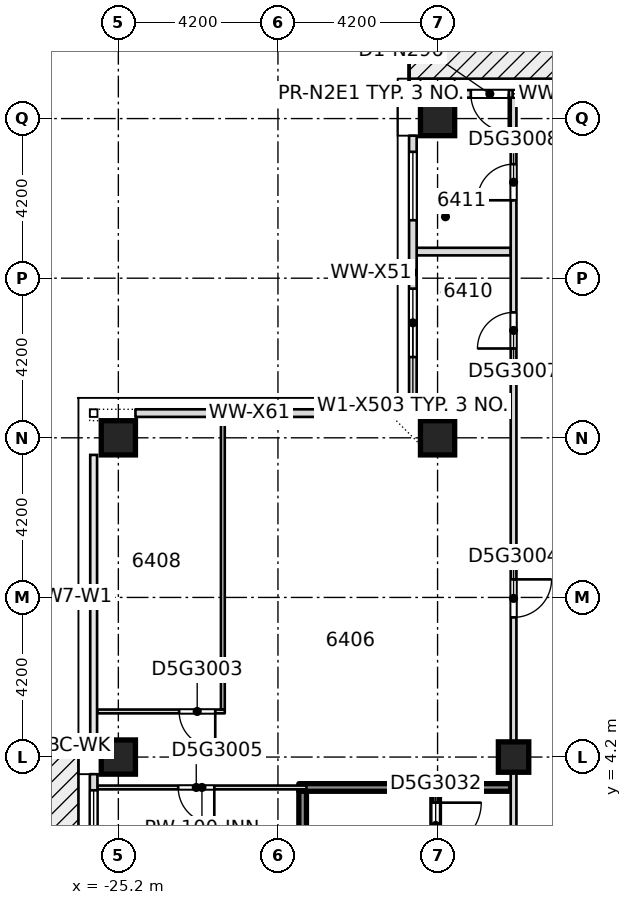
"""IFC4 building model, lengths in metres.
Left out: names, types, materials, properties, quantities, classifications, styles, units other than length and angle.
Written with IfcOpenShell. Run it as: python <this file> out.ifc"""

import sys

from ifc_helpers import new_model, si_unit, direction, frame, frame_2d, origin, origin_2d, place, context, subcontext, project, spatial, rectangle, extrude, element, fill, save


model = new_model("IFC4")
c1 = context("Model", 3, precision=1e-05, world=origin(), true_north=direction((0.0, 1.0)))
c2 = subcontext(c1, "Body", "Model", "MODEL_VIEW")
j1 = project(units=[si_unit("LENGTHUNIT", "METRE"), si_unit("PLANEANGLEUNIT", "RADIAN")], contexts=[c1])
p1 = place(None, origin())
s1 = spatial("IfcSite", under=j1, at=p1, CompositionType="ELEMENT")
p2 = place(p1, origin())
s2 = spatial("IfcBuilding", under=s1, at=p2, CompositionType="ELEMENT")
p3 = place(p2, frame((0.0, 0.0, 244.15)))
s3 = spatial("IfcBuildingStorey", under=s2, at=p3, CompositionType="ELEMENT", Elevation=244.15)
for number, where, z_axis, x_axis in (
    (1, (-25.2, 4.2, -0.4), (0.0, 0.0, 1.0), (1.0, 0.0, 0.0)),
    (2, (-25.2, 12.6, -0.4), (0.0, 0.0, 1.0), (1.0, 0.0, 0.0)),
    (3, (-16.8, 12.6, -0.4), (0.0, 0.0, 1.0), (1.0, 0.0, 0.0)),
    (4, (-16.8, 21.0, -0.4), (0.0, 0.0, 1.0), (1.0, 0.0, 0.0)),
):
    element("IfcColumn", number, at=place(p3, frame(where, z_axis=z_axis, x_axis=x_axis)), inside=s3, PredefinedType="COLUMN", context=c2, shape_type="SweptSolid", body=[
        extrude(rectangle(XDim=0.9, YDim=0.9, at=origin_2d()), origin(), (0.0, 0.0, 1.0), 3.45),
    ])
p4 = place(p3, frame((-14.8, 4.2, -0.4), z_axis=(0.0, 0.0, 1.0), x_axis=(1.0, 0.0, 0.0)))
e5 = element("IfcColumn", 5, at=p4, inside=s3, PredefinedType="COLUMN", context=c2, shape_type="SweptSolid", body=[
    extrude(rectangle(XDim=0.8, YDim=0.8, at=origin_2d()), origin(), (0.0, 0.0, 1.0), 3.45),
])
p5 = place(p3, frame((-25.75, 3.4, 0.0), z_axis=(0.0, 0.0, 1.0), x_axis=(1.0, 0.0, 0.0)))
e6 = element("IfcWall", 6, at=p5, inside=s3, PredefinedType="PARTITIONING", context=c2, shape_type="SweptSolid", body=[
    extrude(rectangle(XDim=5.5, YDim=0.1, at=frame_2d((2.75, 0.0))), origin(), (0.0, 0.0, 1.0), 3.05),
])
p6 = place(p5, frame((2.125, 0.0, 0.0)))
e7 = element("IfcOpeningElement", 7, at=p6, cuts=e6, PredefinedType="OPENING", context=c2, shape_type="SweptSolid", body=[
    extrude(rectangle(XDim=0.95, YDim=2.1, at=frame_2d((0.475, 1.05))), frame((0.0, 0.06, 0.0), z_axis=(0.0, -1.0, 0.0), x_axis=(1.0, 0.0, 0.0)), (0.0, 0.0, 1.0), 0.12),
])
p7 = place(p3, frame((-20.45, 3.4, 0.0), z_axis=(0.0, 0.0, 1.0), x_axis=(1.0, 0.0, 0.0)))
e8 = element("IfcWall", 8, at=p7, inside=s3, PredefinedType="SOLIDWALL", context=c2, shape_type="SweptSolid", body=[
    extrude(rectangle(XDim=5.575, YDim=0.2, at=frame_2d((2.788, 0.0))), origin(), (0.0, 0.0, 1.0), 3.05),
])
p8 = place(p3, frame((-25.75, 5.4, 0.0), z_axis=(0.0, 0.0, 1.0), x_axis=(1.0, 0.0, 0.0)))
e9 = element("IfcWall", 9, at=p8, inside=s3, PredefinedType="PARTITIONING", context=c2, shape_type="SweptSolid", body=[
    extrude(rectangle(XDim=3.35, YDim=0.1, at=frame_2d((1.675, 0.0))), origin(), (0.0, 0.0, 1.0), 3.05),
])
p9 = place(p8, frame((2.15, 0.0, 0.0)))
e10 = element("IfcOpeningElement", 10, at=p9, cuts=e9, PredefinedType="OPENING", context=c2, shape_type="SweptSolid", body=[
    extrude(rectangle(XDim=0.95, YDim=2.1, at=frame_2d((0.475, 1.05))), frame((0.0, 0.06, 0.0), z_axis=(0.0, -1.0, 0.0), x_axis=(1.0, 0.0, 0.0)), (0.0, 0.0, 1.0), 0.12),
])
for number, where, z_axis, x_axis in (
    (11, (-17.35, 13.35, 0.0), (0.0, 0.0, 1.0), (1.0, 0.0, 0.0)),
    (12, (-17.35, 17.5, 0.0), (0.0, 0.0, 1.0), (1.0, 0.0, 0.0)),
):
    element("IfcWall", number, at=place(p3, frame(where, z_axis=z_axis, x_axis=x_axis)), inside=s3, PredefinedType="PARTITIONING", context=c2, shape_type="SweptSolid", body=[
        extrude(rectangle(XDim=2.475, YDim=0.2, at=frame_2d((1.238, 0.0))), origin(), (0.0, 0.0, 1.0), 3.05),
    ])
p10 = place(p3, frame((-22.45, 5.45, 0.0), z_axis=(0.0, 0.0, 1.0), x_axis=(0.0, 1.0, 0.0)))
e13 = element("IfcWall", 13, at=p10, inside=s3, PredefinedType="PARTITIONING", context=c2, shape_type="SweptSolid", body=[
    extrude(rectangle(XDim=7.7, YDim=0.1, at=frame_2d((3.85, 0.0))), origin(), (0.0, 0.0, 1.0), 3.05),
])
p11 = place(p3, frame((-20.35, -0.53, 0.0), z_axis=(0.0, 0.0, 1.0), x_axis=(0.0, 1.0, 0.0)))
e14 = element("IfcWall", 14, at=p11, inside=s3, PredefinedType="SOLIDWALL", context=c2, shape_type="SweptSolid", body=[
    extrude(rectangle(XDim=3.83, YDim=0.2, at=frame_2d((1.915, 0.0))), origin(), (0.0, 0.0, 1.0), 3.05),
])
p12 = place(p3, frame((-16.85, -3.3, 0.0), z_axis=(0.0, 0.0, 1.0), x_axis=(0.0, 1.0, 0.0)))
e15 = element("IfcWall", 15, at=p12, inside=s3, PredefinedType="SOLIDWALL", context=c2, shape_type="SweptSolid", body=[
    extrude(rectangle(XDim=6.6, YDim=0.2, at=frame_2d((3.3, 0.0))), origin(), (0.0, 0.0, 1.0), 3.05),
])
p13 = place(p12, frame((5.1, 0.0, 0.0)))
e16 = element("IfcOpeningElement", 16, at=p13, cuts=e15, PredefinedType="OPENING", context=c2, shape_type="SweptSolid", body=[
    extrude(rectangle(XDim=1.2, YDim=2.1, at=frame_2d((0.6, 1.05))), frame((0.0, 0.11, 0.0), z_axis=(0.0, -1.0, 0.0), x_axis=(1.0, 0.0, 0.0)), (0.0, 0.0, 1.0), 0.22),
])
p14 = place(p3, frame((-14.8, -9.85, 0.0), z_axis=(0.0, 0.0, 1.0), x_axis=(0.0, 1.0, 0.0)))
e17 = element("IfcWall", 17, at=p14, inside=s3, PredefinedType="PARTITIONING", context=c2, shape_type="SweptSolid", body=[
    extrude(rectangle(XDim=31.4, YDim=0.15, at=frame_2d((15.7, 0.0))), origin(), (0.0, 0.0, 1.0), 3.05),
])
p15 = place(p14, frame((0.3, 0.0, 0.0)))
e18 = element("IfcOpeningElement", 18, at=p15, cuts=e17, PredefinedType="OPENING", context=c2, shape_type="SweptSolid", body=[
    extrude(rectangle(XDim=0.95, YDim=2.1, at=frame_2d((0.475, 1.05))), frame((0.0, 0.085, 0.0), z_axis=(0.0, -1.0, 0.0), x_axis=(1.0, 0.0, 0.0)), (0.0, 0.0, 1.0), 0.17),
])
p16 = place(p14, frame((17.725, 0.0, 0.0)))
e19 = element("IfcOpeningElement", 19, at=p16, cuts=e17, PredefinedType="OPENING", context=c2, shape_type="SweptSolid", body=[
    extrude(rectangle(XDim=1.0, YDim=2.1, at=frame_2d((0.5, 1.05))), frame((0.0, 0.085, 0.0), z_axis=(0.0, -1.0, 0.0), x_axis=(1.0, 0.0, 0.0)), (0.0, 0.0, 1.0), 0.17),
])
p17 = place(p14, frame((24.8, 0.0, 0.0)))
e20 = element("IfcOpeningElement", 20, at=p17, cuts=e17, PredefinedType="OPENING", context=c2, shape_type="SweptSolid", body=[
    extrude(rectangle(XDim=0.95, YDim=2.1, at=frame_2d((0.475, 1.05))), frame((0.0, 0.085, 0.0), z_axis=(0.0, -1.0, 0.0), x_axis=(1.0, 0.0, 0.0)), (0.0, 0.0, 1.0), 0.17),
])
p18 = place(p14, frame((28.7, 0.0, 0.0)))
e21 = element("IfcOpeningElement", 21, at=p18, cuts=e17, PredefinedType="OPENING", context=c2, shape_type="SweptSolid", body=[
    extrude(rectangle(XDim=0.95, YDim=2.1, at=frame_2d((0.475, 1.05))), frame((0.0, 0.085, 0.0), z_axis=(0.0, -1.0, 0.0), x_axis=(1.0, 0.0, 0.0)), (0.0, 0.0, 1.0), 0.17),
])
p19 = place(p14, frame((9.3, 0.0, 0.0)))
e22 = element("IfcOpeningElement", 22, at=p19, cuts=e17, PredefinedType="OPENING", context=c2, shape_type="SweptSolid", body=[
    extrude(rectangle(XDim=1.1, YDim=2.1, at=frame_2d((0.55, 1.05))), frame((0.0, 0.085, 0.0), z_axis=(0.0, -1.0, 0.0), x_axis=(1.0, 0.0, 0.0)), (0.0, 0.0, 1.0), 0.17),
])
p20 = place(p14, frame((4.15, 0.0, 0.0)))
e23 = element("IfcOpeningElement", 23, at=p20, cuts=e17, PredefinedType="OPENING", context=c2, shape_type="SweptSolid", body=[
    extrude(rectangle(XDim=1.0, YDim=2.1, at=frame_2d((0.5, 1.05))), frame((0.0, 0.085, 0.0), z_axis=(0.0, -1.0, 0.0), x_axis=(1.0, 0.0, 0.0)), (0.0, 0.0, 1.0), 0.17),
])
p21 = place(p3, frame((-12.6, 21.65, 0.0), z_axis=(0.0, 0.0, 1.0), x_axis=(-1.0, 0.0, 0.0)))
e24 = element("IfcWall", 24, at=p21, inside=s3, PredefinedType="STANDARD", context=c2, shape_type="SweptSolid", body=[
    extrude(rectangle(XDim=3.75, YDim=0.2, at=frame_2d((1.875, 0.0))), origin(), (0.0, 0.0, 1.0), 3.05),
])
p22 = place(p21, frame((0.425, 0.0, 0.2)))
e25 = element("IfcOpeningElement", 25, at=p22, cuts=e24, PredefinedType="OPENING", context=c2, shape_type="SweptSolid", body=[
    extrude(rectangle(XDim=1.8, YDim=2.65, at=frame_2d((0.9, 1.325))), frame((0.0, 0.11, 0.0), z_axis=(0.0, -1.0, 0.0), x_axis=(1.0, 0.0, 0.0)), (0.0, 0.0, 1.0), 0.22),
])
p23 = place(p21, frame((2.325, 0.0, 0.0)))
e26 = element("IfcOpeningElement", 26, at=p23, cuts=e24, PredefinedType="OPENING", context=c2, shape_type="SweptSolid", body=[
    extrude(rectangle(XDim=1.0, YDim=2.4, at=frame_2d((0.5, 1.2))), frame((0.0, 0.11, 0.0), z_axis=(0.0, -1.0, 0.0), x_axis=(1.0, 0.0, 0.0)), (0.0, 0.0, 1.0), 0.22),
])
p24 = place(p3, frame((-17.45, 20.55, 0.0), z_axis=(0.0, 0.0, 1.0), x_axis=(0.0, -1.0, 0.0)))
e27 = element("IfcWall", 27, at=p24, inside=s3, PredefinedType="STANDARD", context=c2, shape_type="SweptSolid", body=[
    extrude(rectangle(XDim=7.2, YDim=0.2, at=frame_2d((3.6, 0.0))), origin(), (0.0, 0.0, 1.0), 3.05),
])
p25 = place(p24, frame((4.025, 0.0, 0.2)))
e28 = element("IfcOpeningElement", 28, at=p25, cuts=e27, PredefinedType="OPENING", context=c2, shape_type="SweptSolid", body=[
    extrude(rectangle(XDim=1.8, YDim=2.65, at=frame_2d((0.9, 1.325))), frame((0.0, 0.11, 0.0), z_axis=(0.0, -1.0, 0.0), x_axis=(1.0, 0.0, 0.0)), (0.0, 0.0, 1.0), 0.22),
])
p26 = place(p24, frame((0.425, 0.0, 0.2)))
e29 = element("IfcOpeningElement", 29, at=p26, cuts=e27, PredefinedType="OPENING", context=c2, shape_type="SweptSolid", body=[
    extrude(rectangle(XDim=1.8, YDim=2.65, at=frame_2d((0.9, 1.325))), frame((0.0, 0.11, 0.0), z_axis=(0.0, -1.0, 0.0), x_axis=(1.0, 0.0, 0.0)), (0.0, 0.0, 1.0), 0.22),
])
p27 = place(p3, frame((-17.55, 13.25, 0.0), z_axis=(0.0, 0.0, 1.0), x_axis=(-1.0, 0.0, 0.0)))
e30 = element("IfcWall", 30, at=p27, inside=s3, PredefinedType="STANDARD", context=c2, shape_type="SweptSolid", body=[
    extrude(rectangle(XDim=7.2, YDim=0.2, at=frame_2d((3.6, 0.0))), origin(), (0.0, 0.0, 1.0), 3.05),
])
p28 = place(p3, frame((-25.85, 3.75, 0.0), z_axis=(0.0, 0.0, 1.0), x_axis=(0.0, -1.0, 0.0)))
e31 = element("IfcWall", 31, at=p28, inside=s3, PredefinedType="STANDARD", context=c2, shape_type="SweptSolid", body=[
    extrude(rectangle(XDim=7.5, YDim=0.2, at=frame_2d((3.75, 0.0))), origin(), (0.0, 0.0, 1.0), 3.05),
])
p29 = place(p28, frame((4.175, 0.0, 0.2)))
e32 = element("IfcOpeningElement", 32, at=p29, cuts=e31, PredefinedType="OPENING", context=c2, shape_type="SweptSolid", body=[
    extrude(rectangle(XDim=1.8, YDim=2.65, at=frame_2d((0.9, 1.325))), frame((0.0, 0.11, 0.0), z_axis=(0.0, -1.0, 0.0), x_axis=(1.0, 0.0, 0.0)), (0.0, 0.0, 1.0), 0.22),
])
p30 = place(p28, frame((6.025, 0.0, 0.0)))
e33 = element("IfcOpeningElement", 33, at=p30, cuts=e31, PredefinedType="OPENING", context=c2, shape_type="SweptSolid", body=[
    extrude(rectangle(XDim=1.0, YDim=2.4, at=frame_2d((0.5, 1.2))), frame((0.0, 0.11, 0.0), z_axis=(0.0, -1.0, 0.0), x_axis=(1.0, 0.0, 0.0)), (0.0, 0.0, 1.0), 0.22),
])
p31 = place(p28, frame((0.425, 0.0, 0.2)))
e34 = element("IfcOpeningElement", 34, at=p31, cuts=e31, PredefinedType="OPENING", context=c2, shape_type="SweptSolid", body=[
    extrude(rectangle(XDim=1.8, YDim=2.65, at=frame_2d((0.9, 1.325))), frame((0.0, 0.11, 0.0), z_axis=(0.0, -1.0, 0.0), x_axis=(1.0, 0.0, 0.0)), (0.0, 0.0, 1.0), 0.22),
])
p32 = place(p28, frame((2.325, 0.0, 0.0)))
e35 = element("IfcOpeningElement", 35, at=p32, cuts=e31, PredefinedType="OPENING", context=c2, shape_type="SweptSolid", body=[
    extrude(rectangle(XDim=1.0, YDim=2.4, at=frame_2d((0.5, 1.2))), frame((0.0, 0.11, 0.0), z_axis=(0.0, -1.0, 0.0), x_axis=(1.0, 0.0, 0.0)), (0.0, 0.0, 1.0), 0.22),
])
p33 = place(p9, origin())
e36 = element("IfcDoor", 36, at=p33, inside=s3, OperationType="SINGLE_SWING_RIGHT", PredefinedType="DOOR", context=c2, shape_type="SweptSolid", body=[
    extrude(rectangle(XDim=0.95, YDim=2.1, at=frame_2d((0.475, 1.05))), frame((0.0, 0.025, 0.0), z_axis=(0.0, -1.0, 0.0), x_axis=(1.0, 0.0, 0.0)), (0.0, 0.0, 1.0), 0.05),
])
fill(e10, e36)
p34 = place(p16, origin())
e37 = element("IfcDoor", 37, at=p34, inside=s3, OperationType="SINGLE_SWING_RIGHT", PredefinedType="DOOR", context=c2, shape_type="SweptSolid", body=[
    extrude(rectangle(XDim=1.0, YDim=2.1, at=frame_2d((0.5, 1.05))), frame((0.0, 0.025, 0.0), z_axis=(0.0, -1.0, 0.0), x_axis=(1.0, 0.0, 0.0)), (0.0, 0.0, 1.0), 0.05),
])
fill(e19, e37)
p35 = place(p6, origin())
e38 = element("IfcDoor", 38, at=p35, inside=s3, OperationType="SINGLE_SWING_LEFT", PredefinedType="DOOR", context=c2, shape_type="SweptSolid", body=[
    extrude(rectangle(XDim=0.95, YDim=2.1, at=frame_2d((0.475, 1.05))), frame((0.0, 0.025, 0.0), z_axis=(0.0, -1.0, 0.0), x_axis=(1.0, 0.0, 0.0)), (0.0, 0.0, 1.0), 0.05),
])
fill(e7, e38)
p36 = place(p17, origin())
e39 = element("IfcDoor", 39, at=p36, inside=s3, OperationType="SINGLE_SWING_LEFT", PredefinedType="DOOR", context=c2, shape_type="SweptSolid", body=[
    extrude(rectangle(XDim=0.95, YDim=2.1, at=frame_2d((0.475, 1.05))), frame((0.0, 0.025, 0.0), z_axis=(0.0, -1.0, 0.0), x_axis=(1.0, 0.0, 0.0)), (0.0, 0.0, 1.0), 0.05),
])
fill(e20, e39)
p37 = place(p18, origin())
e40 = element("IfcDoor", 40, at=p37, inside=s3, OperationType="SINGLE_SWING_LEFT", PredefinedType="DOOR", context=c2, shape_type="SweptSolid", body=[
    extrude(rectangle(XDim=0.95, YDim=2.1, at=frame_2d((0.475, 1.05))), frame((0.0, 0.025, 0.0), z_axis=(0.0, -1.0, 0.0), x_axis=(1.0, 0.0, 0.0)), (0.0, 0.0, 1.0), 0.05),
])
fill(e21, e40)
p38 = place(p13, origin())
e41 = element("IfcDoor", 41, at=p38, inside=s3, OperationType="SINGLE_SWING_RIGHT", PredefinedType="DOOR", context=c2, shape_type="SweptSolid", body=[
    extrude(rectangle(XDim=1.2, YDim=2.1, at=frame_2d((0.6, 1.05))), frame((0.0, 0.025, 0.0), z_axis=(0.0, -1.0, 0.0), x_axis=(1.0, 0.0, 0.0)), (0.0, 0.0, 1.0), 0.05),
])
fill(e16, e41)
p39 = place(p22, origin())
e42 = element("IfcWindow", 42, at=p39, inside=s3, PartitioningType="SINGLE_PANEL", PredefinedType="WINDOW", context=c2, shape_type="SweptSolid", body=[
    extrude(rectangle(XDim=1.8, YDim=2.65, at=frame_2d((0.9, 1.325))), frame((0.0, 0.03, 0.0), z_axis=(0.0, -1.0, 0.0), x_axis=(1.0, 0.0, 0.0)), (0.0, 0.0, 1.0), 0.06),
])
fill(e25, e42)
p40 = place(p23, origin())
e43 = element("IfcDoor", 43, at=p40, inside=s3, OperationType="SINGLE_SWING_LEFT", PredefinedType="DOOR", context=c2, shape_type="SweptSolid", body=[
    extrude(rectangle(XDim=1.0, YDim=2.4, at=frame_2d((0.5, 1.2))), frame((0.0, 0.025, 0.0), z_axis=(0.0, -1.0, 0.0), x_axis=(1.0, 0.0, 0.0)), (0.0, 0.0, 1.0), 0.05),
])
fill(e26, e43)
p41 = place(p25, origin())
e44 = element("IfcWindow", 44, at=p41, inside=s3, PartitioningType="SINGLE_PANEL", PredefinedType="WINDOW", context=c2, shape_type="SweptSolid", body=[
    extrude(rectangle(XDim=1.8, YDim=2.65, at=frame_2d((0.9, 1.325))), frame((0.0, 0.03, 0.0), z_axis=(0.0, -1.0, 0.0), x_axis=(1.0, 0.0, 0.0)), (0.0, 0.0, 1.0), 0.06),
])
fill(e28, e44)
p42 = place(p26, origin())
e45 = element("IfcWindow", 45, at=p42, inside=s3, PartitioningType="SINGLE_PANEL", PredefinedType="WINDOW", context=c2, shape_type="SweptSolid", body=[
    extrude(rectangle(XDim=1.8, YDim=2.65, at=frame_2d((0.9, 1.325))), frame((0.0, 0.03, 0.0), z_axis=(0.0, -1.0, 0.0), x_axis=(1.0, 0.0, 0.0)), (0.0, 0.0, 1.0), 0.06),
])
fill(e29, e45)
p43 = place(p31, origin())
e46 = element("IfcWindow", 46, at=p43, inside=s3, PartitioningType="SINGLE_PANEL", PredefinedType="WINDOW", context=c2, shape_type="SweptSolid", body=[
    extrude(rectangle(XDim=1.8, YDim=2.65, at=frame_2d((0.9, 1.325))), frame((0.0, 0.03, 0.0), z_axis=(0.0, -1.0, 0.0), x_axis=(1.0, 0.0, 0.0)), (0.0, 0.0, 1.0), 0.06),
])
fill(e34, e46)
save(model, sys.argv[1])
